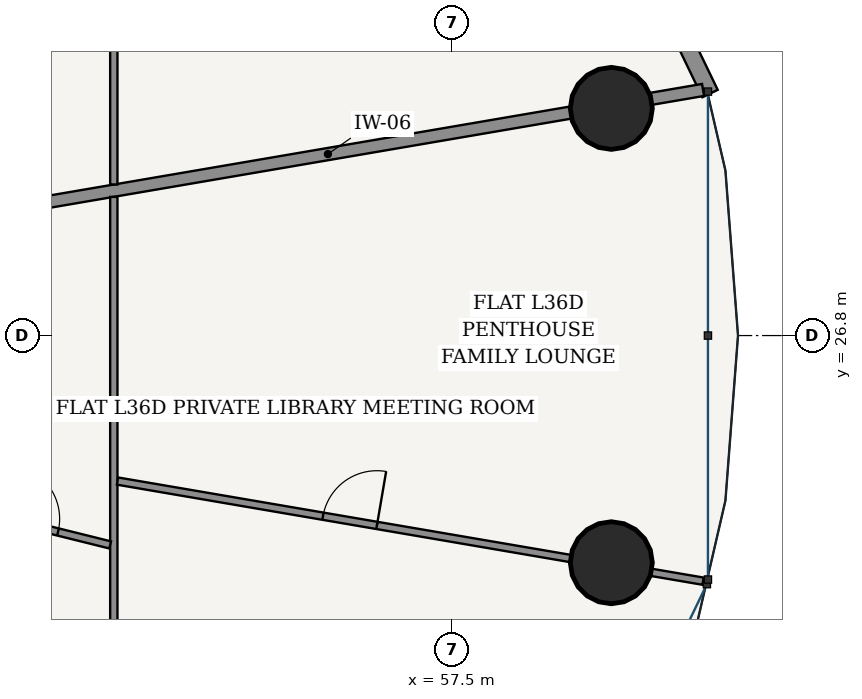
"""IFC4 building model, lengths in metres.
Left out: names, types, materials, properties, quantities, classifications, styles, units other than length and angle.
Written with IfcOpenShell. Run it as: python <this file> out.ifc"""

import sys

from ifc_helpers import new_model, si_unit, direction, frame, frame_2d, origin, origin_2d, place, context, subcontext, project, spatial, rectangle, hollow_circle, extrude, source, transform, mapped, element, fill, save


model = new_model("IFC4")
c1 = context("Model", 3, precision=1e-05, world=origin(), true_north=direction((-0.2419218956, 0.970295726276)))
c2 = subcontext(c1, "Body", "Model", "MODEL_VIEW")
j1 = project(units=[si_unit("LENGTHUNIT", "METRE"), si_unit("PLANEANGLEUNIT", "RADIAN")], contexts=[c1])
p1 = place(None, origin())
s1 = spatial("IfcSite", under=j1, at=p1, CompositionType="ELEMENT")
p2 = place(p1, origin())
s2 = spatial("IfcBuilding", under=s1, at=p2, CompositionType="ELEMENT")
p3 = place(p2, frame((0.0, 0.0, 139.0)))
s3 = spatial("IfcBuildingStorey", under=s2, at=p3, CompositionType="ELEMENT", Elevation=139.0)
for number, where, z_axis, x_axis in (
    (1, (60.117, 30.536, 0.0), (0.0, 0.0, 1.0), (1.0, 0.0, 0.0)),
    (2, (60.117, 23.064, 0.0), (0.0, 0.0, 1.0), (1.0, 0.0, 0.0)),
):
    element("IfcColumn", number, at=place(p3, frame(where, z_axis=z_axis, x_axis=x_axis)), inside=s3, PredefinedType="COLUMN", context=c2, shape_type="SweptSolid", body=[
        extrude(hollow_circle(Radius=0.675, WallThickness=0.042, at=origin_2d()), origin(), (0.0, 0.0, 1.0), 3.6),
    ])
p4 = place(p3, frame((61.74, 30.78, 0.0), z_axis=(0.0, 0.0, 1.0), x_axis=(-0.434209827226, 0.900811759437, 0.0)))
e3 = element("IfcWall", 3, at=p4, inside=s3, PredefinedType="SOLIDWALL", context=c2, shape_type="SweptSolid", body=[
    extrude(rectangle(XDim=8.472, YDim=0.28, at=frame_2d((4.236, 0.0))), origin(), (0.0, 0.0, 1.0), 3.33),
])
p5 = place(p4, frame((1.237, 0.0, 0.85)))
e4 = element("IfcOpeningElement", 4, at=p5, cuts=e3, PredefinedType="OPENING", context=c2, shape_type="SweptSolid", body=[
    extrude(rectangle(XDim=2.1, YDim=1.95, at=frame_2d((1.05, 0.975))), frame((0.0, 0.15, 0.0), z_axis=(0.0, -1.0, 0.0), x_axis=(1.0, 0.0, 0.0)), (0.0, 0.0, 1.0), 0.3),
])
p6 = place(p4, frame((5.134, 0.0, 0.85)))
e5 = element("IfcOpeningElement", 5, at=p6, cuts=e3, PredefinedType="OPENING", context=c2, shape_type="SweptSolid", body=[
    extrude(rectangle(XDim=2.1, YDim=1.95, at=frame_2d((1.05, 0.975))), frame((0.0, 0.15, 0.0), z_axis=(0.0, -1.0, 0.0), x_axis=(1.0, 0.0, 0.0)), (0.0, 0.0, 1.0), 0.3),
])
p7 = place(p3, frame((49.287, 28.73, 0.0), z_axis=(0.0, 0.0, 1.0), x_axis=(0.985698993845, 0.168515558725, 0.0)))
e6 = element("IfcWall", 6, at=p7, inside=s3, PredefinedType="PARTITIONING", context=c2, shape_type="SweptSolid", body=[
    extrude(rectangle(XDim=12.517, YDim=0.2, at=frame_2d((6.259, 0.0))), origin(), (0.0, 0.0, 1.0), 2.776),
])
p8 = place(p3, frame((51.935, 37.885, 0.0), z_axis=(0.0, 0.0, 1.0), x_axis=(0.0, -1.0, 0.0)))
e7 = element("IfcWall", 7, at=p8, inside=s3, PredefinedType="PARTITIONING", context=c2, shape_type="SweptSolid", body=[
    extrude(rectangle(XDim=8.601, YDim=0.12, at=frame_2d((4.3, 0.0))), origin(), (0.0, 0.0, 1.0), 2.776),
])
p9 = place(p8, frame((1.021, 0.0, 0.0)))
e8 = element("IfcOpeningElement", 8, at=p9, cuts=e7, PredefinedType="OPENING", context=c2, shape_type="SweptSolid", body=[
    extrude(rectangle(XDim=0.9, YDim=2.15, at=frame_2d((0.45, 1.075))), frame((0.0, 0.07, 0.0), z_axis=(0.0, -1.0, 0.0), x_axis=(1.0, 0.0, 0.0)), (0.0, 0.0, 1.0), 0.14),
])
p10 = place(p3, frame((51.935, 29.08, 0.0), z_axis=(0.0, 0.0, 1.0), x_axis=(0.0, -1.0, 0.0)))
e9 = element("IfcWall", 9, at=p10, inside=s3, PredefinedType="PARTITIONING", context=c2, shape_type="SweptSolid", body=[
    extrude(rectangle(XDim=15.215, YDim=0.12, at=frame_2d((7.608, 0.0))), origin(), (0.0, 0.0, 1.0), 2.776),
])
p11 = place(p10, frame((11.859, 0.0, 0.0)))
e10 = element("IfcOpeningElement", 10, at=p11, cuts=e9, PredefinedType="OPENING", context=c2, shape_type="SweptSolid", body=[
    extrude(rectangle(XDim=0.9, YDim=2.15, at=frame_2d((0.45, 1.075))), frame((0.0, 0.07, 0.0), z_axis=(0.0, -1.0, 0.0), x_axis=(1.0, 0.0, 0.0)), (0.0, 0.0, 1.0), 0.14),
])
p12 = place(p10, frame((7.49, 0.0, 0.0)))
e11 = element("IfcOpeningElement", 11, at=p12, cuts=e9, PredefinedType="OPENING", context=c2, shape_type="SweptSolid", body=[
    extrude(rectangle(XDim=0.9, YDim=2.15, at=frame_2d((0.45, 1.075))), frame((0.0, 0.07, 0.0), z_axis=(0.0, -1.0, 0.0), x_axis=(1.0, 0.0, 0.0)), (0.0, 0.0, 1.0), 0.14),
])
p13 = place(p3, frame((51.996, 24.407, 0.0), z_axis=(0.0, 0.0, 1.0), x_axis=(0.985698378271, -0.168519159369, 0.0)))
e12 = element("IfcWall", 12, at=p13, inside=s3, PredefinedType="PARTITIONING", context=c2, shape_type="SweptSolid", body=[
    extrude(rectangle(XDim=9.769, YDim=0.12, at=frame_2d((4.884, 0.0))), origin(), (0.0, 0.0, 1.0), 2.776),
])
p14 = place(p13, frame((3.428, 0.0, 0.0)))
e13 = element("IfcOpeningElement", 13, at=p14, cuts=e12, PredefinedType="OPENING", context=c2, shape_type="SweptSolid", body=[
    extrude(rectangle(XDim=0.9, YDim=2.15, at=frame_2d((0.45, 1.075))), frame((0.0, 0.07, 0.0), z_axis=(0.0, -1.0, 0.0), x_axis=(1.0, 0.0, 0.0)), (0.0, 0.0, 1.0), 0.14),
])
p15 = place(p3, frame((49.287, 23.999, 0.0), z_axis=(0.0, 0.0, 1.0), x_axis=(0.970571855633, -0.240811696256, 0.0)))
e14 = element("IfcWall", 14, at=p15, inside=s3, PredefinedType="PARTITIONING", context=c2, shape_type="SweptSolid", body=[
    extrude(rectangle(XDim=2.666, YDim=0.12, at=frame_2d((1.333, 0.0))), origin(), (0.0, 0.0, 1.0), 3.33),
])
p16 = place(p15, frame((0.883, 0.0, 0.0)))
e15 = element("IfcOpeningElement", 15, at=p16, cuts=e14, PredefinedType="OPENING", context=c2, shape_type="SweptSolid", body=[
    extrude(rectangle(XDim=0.9, YDim=2.15, at=frame_2d((0.45, 1.075))), frame((0.0, 0.07, 0.0), z_axis=(0.0, -1.0, 0.0), x_axis=(1.0, 0.0, 0.0)), (0.0, 0.0, 1.0), 0.14),
])
m1 = source(origin(), c2, "Body", "SweptSolid", [
    extrude(rectangle(XDim=0.9, YDim=2.15, at=frame_2d((0.45, 1.075))), frame((0.0, 0.025, 0.0), z_axis=(0.0, -1.0, 0.0), x_axis=(1.0, 0.0, 0.0)), (0.0, 0.0, 1.0), 0.05),
])
p17 = place(p16, origin())
e16 = element("IfcDoor", 16, at=p17, inside=s3, OperationType="SINGLE_SWING_LEFT", PredefinedType="DOOR", context=c2, shape_type="MappedRepresentation", body=[
    mapped(m1, transform((0.0, 0.0, 0.0), scale=1.0)),
])
fill(e15, e16)
p18 = place(p14, origin())
e17 = element("IfcDoor", 17, at=p18, inside=s3, OperationType="SINGLE_SWING_RIGHT", PredefinedType="DOOR", context=c2, shape_type="MappedRepresentation", body=[
    mapped(m1, transform((0.0, 0.0, 0.0), scale=1.0)),
])
fill(e13, e17)
save(model, sys.argv[1])
